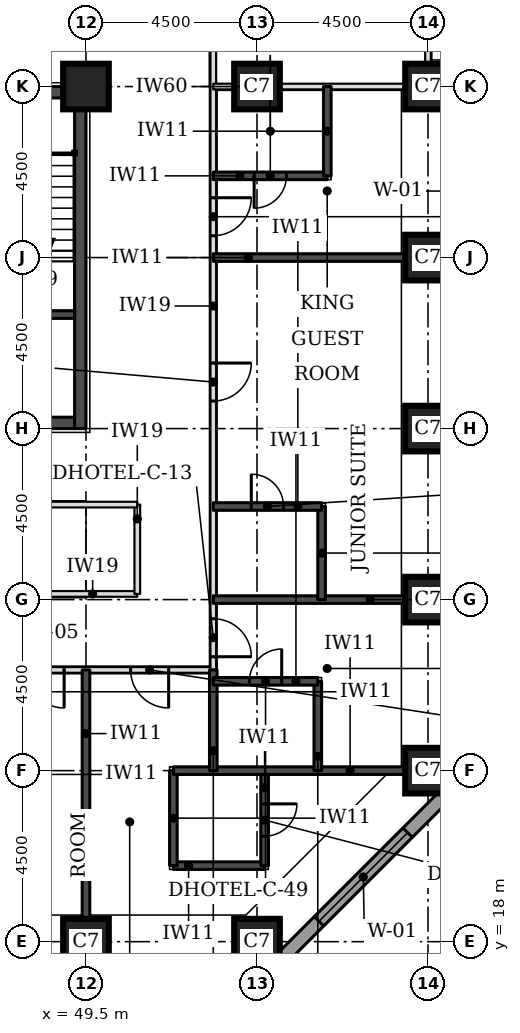
"""IFC4 building model, lengths in metres.
Left out: names, types, materials, properties, quantities, classifications, styles, units other than length and angle.
Written with IfcOpenShell. Run it as: python <this file> out.ifc"""

import sys

from ifc_helpers import new_model, si_unit, direction, frame, frame_2d, origin, origin_2d, place, context, subcontext, project, spatial, rectangle, extrude, element, fill, save


model = new_model("IFC4")
c1 = context("Model", 3, precision=1e-05, world=origin(), true_north=direction((0.0, 1.0)))
c2 = subcontext(c1, "Body", "Model", "MODEL_VIEW")
j1 = project(units=[si_unit("LENGTHUNIT", "METRE"), si_unit("PLANEANGLEUNIT", "RADIAN")], contexts=[c1])
p1 = place(None, origin())
s1 = spatial("IfcSite", under=j1, at=p1, CompositionType="ELEMENT")
p2 = place(p1, origin())
s2 = spatial("IfcBuilding", under=s1, at=p2, CompositionType="ELEMENT")
p3 = place(p2, frame((0.0, 0.0, 33.0)))
s3 = spatial("IfcBuildingStorey", under=s2, at=p3, CompositionType="ELEMENT", Elevation=33.0)
for number, where, z_axis, x_axis in (
    (1, (49.5, 18.0, 0.0), (0.0, 0.0, 1.0), (1.0, 0.0, 0.0)),
    (2, (54.0, 18.0, 0.0), (0.0, 0.0, 1.0), (1.0, 0.0, 0.0)),
    (3, (58.5, 22.5, 0.0), (0.0, 0.0, 1.0), (1.0, 0.0, 0.0)),
    (4, (58.5, 27.0, 0.0), (0.0, 0.0, 1.0), (1.0, 0.0, 0.0)),
    (5, (58.5, 31.5, 0.0), (0.0, 0.0, 1.0), (1.0, 0.0, 0.0)),
    (6, (58.5, 36.0, 0.0), (0.0, 0.0, 1.0), (1.0, 0.0, 0.0)),
    (7, (49.5, 40.5, 0.0), (0.0, 0.0, 1.0), (1.0, 0.0, 0.0)),
    (8, (54.0, 40.5, 0.0), (0.0, 0.0, 1.0), (1.0, 0.0, 0.0)),
    (9, (58.5, 40.5, 0.0), (0.0, 0.0, 1.0), (1.0, 0.0, 0.0)),
):
    element("IfcColumn", number, at=place(p3, frame(where, z_axis=z_axis, x_axis=x_axis)), inside=s3, PredefinedType="COLUMN", context=c2, shape_type="SweptSolid", body=[
        extrude(rectangle(XDim=1.2, YDim=1.2, at=origin_2d()), origin(), (0.0, 0.0, 1.0), 3.3),
    ])
p4 = place(p3, frame((40.8, 31.65, 0.0), z_axis=(0.0, 0.0, 1.0), x_axis=(1.0, 0.0, 0.0)))
e10 = element("IfcWall", 10, at=p4, inside=s3, PredefinedType="SHEAR", context=c2, shape_type="SweptSolid", body=[
    extrude(rectangle(XDim=8.4, YDim=0.3, at=frame_2d((4.2, 0.0))), origin(), (0.0, 0.0, 1.0), 3.3),
])
p5 = place(p4, frame((5.2, 0.0, 0.0)))
e11 = element("IfcOpeningElement", 11, at=p5, cuts=e10, PredefinedType="OPENING", context=c2, shape_type="SweptSolid", body=[
    extrude(rectangle(XDim=1.0, YDim=2.1, at=frame_2d((0.5, 1.05))), frame((0.0, 0.16, 0.0), z_axis=(0.0, -1.0, 0.0), x_axis=(1.0, 0.0, 0.0)), (0.0, 0.0, 1.0), 0.32),
])
p6 = place(p3, frame((40.8, 40.35, 0.0), z_axis=(0.0, 0.0, 1.0), x_axis=(1.0, 0.0, 0.0)))
e12 = element("IfcWall", 12, at=p6, inside=s3, PredefinedType="SHEAR", context=c2, shape_type="SweptSolid", body=[
    extrude(rectangle(XDim=8.4, YDim=0.3, at=frame_2d((4.2, 0.0))), origin(), (0.0, 0.0, 1.0), 3.3),
])
p7 = place(p6, frame((6.4, 0.0, 0.0)))
e13 = element("IfcOpeningElement", 13, at=p7, cuts=e12, PredefinedType="OPENING", context=c2, shape_type="SweptSolid", body=[
    extrude(rectangle(XDim=1.1, YDim=2.1, at=frame_2d((0.55, 1.05))), frame((0.0, 0.16, 0.0), z_axis=(0.0, -1.0, 0.0), x_axis=(1.0, 0.0, 0.0)), (0.0, 0.0, 1.0), 0.32),
])
p8 = place(p3, frame((49.35, 31.5, 0.0), z_axis=(0.0, 0.0, 1.0), x_axis=(0.0, 1.0, 0.0)))
e14 = element("IfcWall", 14, at=p8, inside=s3, PredefinedType="SHEAR", context=c2, shape_type="SweptSolid", body=[
    extrude(rectangle(XDim=9.0, YDim=0.3, at=frame_2d((4.5, 0.0))), origin(), (0.0, 0.0, 1.0), 3.3),
])
p9 = place(p3, frame((54.27, 17.174, 0.0), z_axis=(0.0, 0.0, 1.0), x_axis=(0.707106781187, 0.707106781187, 0.0)))
e15 = element("IfcWall", 15, at=p9, inside=s3, PredefinedType="STANDARD", context=c2, shape_type="SweptSolid", body=[
    extrude(rectangle(XDim=7.151, YDim=0.35, at=frame_2d((3.576, 0.0))), origin(), (0.0, 0.0, 1.0), 3.055),
])
p10 = place(p9, frame((1.926, 0.0, 0.8)))
e16 = element("IfcOpeningElement", 16, at=p10, cuts=e15, PredefinedType="OPENING", context=c2, shape_type="SweptSolid", body=[
    extrude(rectangle(XDim=3.3, YDim=1.5, at=frame_2d((1.65, 0.75))), frame((0.0, 0.185, 0.0), z_axis=(0.0, -1.0, 0.0), x_axis=(1.0, 0.0, 0.0)), (0.0, 0.0, 1.0), 0.37),
])
p11 = place(p3, frame((19.15, 25.15, 0.0), z_axis=(0.0, 0.0, 1.0), x_axis=(1.0, 0.0, 0.0)))
e17 = element("IfcWall", 17, at=p11, inside=s3, PredefinedType="PARTITIONING", context=c2, shape_type="SweptSolid", body=[
    extrude(rectangle(XDim=33.7, YDim=0.15, at=frame_2d((16.85, 0.0))), origin(), (0.0, 0.0, 1.0), 3.08),
])
p12 = place(p11, frame((4.175, 0.0, 0.0)))
e18 = element("IfcOpeningElement", 18, at=p12, cuts=e17, PredefinedType="OPENING", context=c2, shape_type="SweptSolid", body=[
    extrude(rectangle(XDim=1.0, YDim=2.1, at=frame_2d((0.5, 1.05))), frame((0.0, 0.085, 0.0), z_axis=(0.0, -1.0, 0.0), x_axis=(1.0, 0.0, 0.0)), (0.0, 0.0, 1.0), 0.17),
])
p13 = place(p11, frame((13.325, 0.0, 0.0)))
e19 = element("IfcOpeningElement", 19, at=p13, cuts=e17, PredefinedType="OPENING", context=c2, shape_type="SweptSolid", body=[
    extrude(rectangle(XDim=1.0, YDim=2.1, at=frame_2d((0.5, 1.05))), frame((0.0, 0.085, 0.0), z_axis=(0.0, -1.0, 0.0), x_axis=(1.0, 0.0, 0.0)), (0.0, 0.0, 1.0), 0.17),
])
p14 = place(p11, frame((19.625, 0.0, 0.0)))
e20 = element("IfcOpeningElement", 20, at=p14, cuts=e17, PredefinedType="OPENING", context=c2, shape_type="SweptSolid", body=[
    extrude(rectangle(XDim=1.0, YDim=2.1, at=frame_2d((0.5, 1.05))), frame((0.0, 0.085, 0.0), z_axis=(0.0, -1.0, 0.0), x_axis=(1.0, 0.0, 0.0)), (0.0, 0.0, 1.0), 0.17),
])
p15 = place(p11, frame((28.775, 0.0, 0.0)))
e21 = element("IfcOpeningElement", 21, at=p15, cuts=e17, PredefinedType="OPENING", context=c2, shape_type="SweptSolid", body=[
    extrude(rectangle(XDim=1.0, YDim=2.1, at=frame_2d((0.5, 1.05))), frame((0.0, 0.085, 0.0), z_axis=(0.0, -1.0, 0.0), x_axis=(1.0, 0.0, 0.0)), (0.0, 0.0, 1.0), 0.17),
])
p16 = place(p11, frame((1.175, 0.0, 0.0)))
e22 = element("IfcOpeningElement", 22, at=p16, cuts=e17, PredefinedType="OPENING", context=c2, shape_type="SweptSolid", body=[
    extrude(rectangle(XDim=1.0, YDim=2.1, at=frame_2d((0.5, 1.05))), frame((0.0, 0.085, 0.0), z_axis=(0.0, -1.0, 0.0), x_axis=(1.0, 0.0, 0.0)), (0.0, 0.0, 1.0), 0.17),
])
p17 = place(p11, frame((31.525, 0.0, 0.0)))
e23 = element("IfcOpeningElement", 23, at=p17, cuts=e17, PredefinedType="OPENING", context=c2, shape_type="SweptSolid", body=[
    extrude(rectangle(XDim=1.0, YDim=2.1, at=frame_2d((0.5, 1.05))), frame((0.0, 0.085, 0.0), z_axis=(0.0, -1.0, 0.0), x_axis=(1.0, 0.0, 0.0)), (0.0, 0.0, 1.0), 0.17),
])
p18 = place(p3, frame((52.85, 25.15, 0.0), z_axis=(0.0, 0.0, 1.0), x_axis=(0.0, 1.0, 0.0)))
e24 = element("IfcWall", 24, at=p18, inside=s3, PredefinedType="PARTITIONING", context=c2, shape_type="SweptSolid", body=[
    extrude(rectangle(XDim=22.35, YDim=0.15, at=frame_2d((11.175, 0.0))), origin(), (0.0, 0.0, 1.0), 3.08),
])
p19 = place(p18, frame((0.347, 0.0, 0.0)))
e25 = element("IfcOpeningElement", 25, at=p19, cuts=e24, PredefinedType="OPENING", context=c2, shape_type="SweptSolid", body=[
    extrude(rectangle(XDim=1.0, YDim=2.1, at=frame_2d((0.5, 1.05))), frame((0.0, 0.085, 0.0), z_axis=(0.0, -1.0, 0.0), x_axis=(1.0, 0.0, 0.0)), (0.0, 0.0, 1.0), 0.17),
])
p20 = place(p18, frame((7.075, 0.0, 0.0)))
e26 = element("IfcOpeningElement", 26, at=p20, cuts=e24, PredefinedType="OPENING", context=c2, shape_type="SweptSolid", body=[
    extrude(rectangle(XDim=1.0, YDim=2.1, at=frame_2d((0.5, 1.05))), frame((0.0, 0.085, 0.0), z_axis=(0.0, -1.0, 0.0), x_axis=(1.0, 0.0, 0.0)), (0.0, 0.0, 1.0), 0.17),
])
p21 = place(p18, frame((11.425, 0.0, 0.0)))
e27 = element("IfcOpeningElement", 27, at=p21, cuts=e24, PredefinedType="OPENING", context=c2, shape_type="SweptSolid", body=[
    extrude(rectangle(XDim=1.0, YDim=2.1, at=frame_2d((0.5, 1.05))), frame((0.0, 0.085, 0.0), z_axis=(0.0, -1.0, 0.0), x_axis=(1.0, 0.0, 0.0)), (0.0, 0.0, 1.0), 0.17),
])
p22 = place(p18, frame((17.15, 0.0, 0.0)))
e28 = element("IfcOpeningElement", 28, at=p22, cuts=e24, PredefinedType="OPENING", context=c2, shape_type="SweptSolid", body=[
    extrude(rectangle(XDim=0.9, YDim=2.1, at=frame_2d((0.45, 1.05))), frame((0.0, 0.085, 0.0), z_axis=(0.0, -1.0, 0.0), x_axis=(1.0, 0.0, 0.0)), (0.0, 0.0, 1.0), 0.17),
])
p23 = place(p3, frame((40.5, 27.15, 0.0), z_axis=(0.0, 0.0, 1.0), x_axis=(1.0, 0.0, 0.0)))
e29 = element("IfcWall", 29, at=p23, inside=s3, PredefinedType="PARTITIONING", context=c2, shape_type="SweptSolid", body=[
    extrude(rectangle(XDim=10.35, YDim=0.15, at=frame_2d((5.175, 0.0))), origin(), (0.0, 0.0, 1.0), 3.08),
])
p24 = place(p3, frame((50.85, 27.15, 0.0), z_axis=(0.0, 0.0, 1.0), x_axis=(0.0, 1.0, 0.0)))
e30 = element("IfcWall", 30, at=p24, inside=s3, PredefinedType="PARTITIONING", context=c2, shape_type="SweptSolid", body=[
    extrude(rectangle(XDim=2.35, YDim=0.15, at=frame_2d((1.175, 0.0))), origin(), (0.0, 0.0, 1.0), 3.08),
])
p25 = place(p3, frame((40.5, 29.5, 0.0), z_axis=(0.0, 0.0, 1.0), x_axis=(1.0, 0.0, 0.0)))
e31 = element("IfcWall", 31, at=p25, inside=s3, PredefinedType="PARTITIONING", context=c2, shape_type="SweptSolid", body=[
    extrude(rectangle(XDim=10.35, YDim=0.15, at=frame_2d((5.175, 0.0))), origin(), (0.0, 0.0, 1.0), 3.08),
])
p26 = place(p25, frame((4.06, 0.0, 0.0)))
e32 = element("IfcOpeningElement", 32, at=p26, cuts=e31, PredefinedType="OPENING", context=c2, shape_type="SweptSolid", body=[
    extrude(rectangle(XDim=0.9, YDim=2.1, at=frame_2d((0.45, 1.05))), frame((0.0, 0.085, 0.0), z_axis=(0.0, -1.0, 0.0), x_axis=(1.0, 0.0, 0.0)), (0.0, 0.0, 1.0), 0.17),
])
p27 = place(p3, frame((49.5, 18.6, 0.0), z_axis=(0.0, 0.0, 1.0), x_axis=(0.0, 1.0, 0.0)))
e33 = element("IfcWall", 33, at=p27, inside=s3, PredefinedType="SOLIDWALL", context=c2, shape_type="SweptSolid", body=[
    extrude(rectangle(XDim=6.55, YDim=0.2, at=frame_2d((3.275, 0.0))), origin(), (0.0, 0.0, 1.0), 3.08),
])
p28 = place(p3, frame((51.8, 20.0, 0.0), z_axis=(0.0, 0.0, 1.0), x_axis=(1.0, 0.0, 0.0)))
e34 = element("IfcWall", 34, at=p28, inside=s3, PredefinedType="SOLIDWALL", context=c2, shape_type="SweptSolid", body=[
    extrude(rectangle(XDim=2.4, YDim=0.2, at=frame_2d((1.2, 0.0))), origin(), (0.0, 0.0, 1.0), 3.08),
])
p29 = place(p3, frame((51.8, 20.0, 0.0), z_axis=(0.0, 0.0, 1.0), x_axis=(0.0, 1.0, 0.0)))
e35 = element("IfcWall", 35, at=p29, inside=s3, PredefinedType="SOLIDWALL", context=c2, shape_type="SweptSolid", body=[
    extrude(rectangle(XDim=2.5, YDim=0.2, at=frame_2d((1.25, 0.0))), origin(), (0.0, 0.0, 1.0), 3.08),
])
p30 = place(p3, frame((54.2, 20.0, 0.0), z_axis=(0.0, 0.0, 1.0), x_axis=(0.0, 1.0, 0.0)))
e36 = element("IfcWall", 36, at=p30, inside=s3, PredefinedType="SOLIDWALL", context=c2, shape_type="SweptSolid", body=[
    extrude(rectangle(XDim=2.5, YDim=0.2, at=frame_2d((1.25, 0.0))), origin(), (0.0, 0.0, 1.0), 3.08),
])
p31 = place(p30, frame((0.775, 0.0, 0.0)))
e37 = element("IfcOpeningElement", 37, at=p31, cuts=e36, PredefinedType="OPENING", context=c2, shape_type="SweptSolid", body=[
    extrude(rectangle(XDim=0.85, YDim=2.1, at=frame_2d((0.425, 1.05))), frame((0.0, 0.11, 0.0), z_axis=(0.0, -1.0, 0.0), x_axis=(1.0, 0.0, 0.0)), (0.0, 0.0, 1.0), 0.22),
])
p32 = place(p3, frame((51.8, 22.5, 0.0), z_axis=(0.0, 0.0, 1.0), x_axis=(1.0, 0.0, 0.0)))
e38 = element("IfcWall", 38, at=p32, inside=s3, PredefinedType="SOLIDWALL", context=c2, shape_type="SweptSolid", body=[
    extrude(rectangle(XDim=6.1, YDim=0.2, at=frame_2d((3.05, 0.0))), origin(), (0.0, 0.0, 1.0), 3.08),
])
p33 = place(p3, frame((52.85, 22.5, 0.0), z_axis=(0.0, 0.0, 1.0), x_axis=(0.0, 1.0, 0.0)))
e39 = element("IfcWall", 39, at=p33, inside=s3, PredefinedType="SOLIDWALL", context=c2, shape_type="SweptSolid", body=[
    extrude(rectangle(XDim=2.65, YDim=0.2, at=frame_2d((1.325, 0.0))), origin(), (0.0, 0.0, 1.0), 3.08),
])
p34 = place(p3, frame((55.6, 22.5, 0.0), z_axis=(0.0, 0.0, 1.0), x_axis=(0.0, 1.0, 0.0)))
e40 = element("IfcWall", 40, at=p34, inside=s3, PredefinedType="SOLIDWALL", context=c2, shape_type="SweptSolid", body=[
    extrude(rectangle(XDim=2.35, YDim=0.2, at=frame_2d((1.175, 0.0))), origin(), (0.0, 0.0, 1.0), 3.08),
])
p35 = place(p3, frame((52.85, 24.85, 0.0), z_axis=(0.0, 0.0, 1.0), x_axis=(1.0, 0.0, 0.0)))
e41 = element("IfcWall", 41, at=p35, inside=s3, PredefinedType="SOLIDWALL", context=c2, shape_type="SweptSolid", body=[
    extrude(rectangle(XDim=2.75, YDim=0.2, at=frame_2d((1.375, 0.0))), origin(), (0.0, 0.0, 1.0), 3.08),
])
p36 = place(p35, frame((0.95, 0.0, 0.0)))
e42 = element("IfcOpeningElement", 42, at=p36, cuts=e41, PredefinedType="OPENING", context=c2, shape_type="SweptSolid", body=[
    extrude(rectangle(XDim=0.85, YDim=2.1, at=frame_2d((0.425, 1.05))), frame((0.0, 0.11, 0.0), z_axis=(0.0, -1.0, 0.0), x_axis=(1.0, 0.0, 0.0)), (0.0, 0.0, 1.0), 0.22),
])
p37 = place(p3, frame((52.85, 27.0, 0.0), z_axis=(0.0, 0.0, 1.0), x_axis=(1.0, 0.0, 0.0)))
e43 = element("IfcWall", 43, at=p37, inside=s3, PredefinedType="SOLIDWALL", context=c2, shape_type="SweptSolid", body=[
    extrude(rectangle(XDim=5.05, YDim=0.2, at=frame_2d((2.525, 0.0))), origin(), (0.0, 0.0, 1.0), 3.08),
])
p38 = place(p3, frame((55.7, 27.0, 0.0), z_axis=(0.0, 0.0, 1.0), x_axis=(0.0, 1.0, 0.0)))
e44 = element("IfcWall", 44, at=p38, inside=s3, PredefinedType="SOLIDWALL", context=c2, shape_type="SweptSolid", body=[
    extrude(rectangle(XDim=2.45, YDim=0.2, at=frame_2d((1.225, 0.0))), origin(), (0.0, 0.0, 1.0), 3.08),
])
p39 = place(p3, frame((52.85, 29.45, 0.0), z_axis=(0.0, 0.0, 1.0), x_axis=(1.0, 0.0, 0.0)))
e45 = element("IfcWall", 45, at=p39, inside=s3, PredefinedType="SOLIDWALL", context=c2, shape_type="SweptSolid", body=[
    extrude(rectangle(XDim=2.85, YDim=0.2, at=frame_2d((1.425, 0.0))), origin(), (0.0, 0.0, 1.0), 3.08),
])
p40 = place(p39, frame((1.0, 0.0, 0.0)))
e46 = element("IfcOpeningElement", 46, at=p40, cuts=e45, PredefinedType="OPENING", context=c2, shape_type="SweptSolid", body=[
    extrude(rectangle(XDim=0.85, YDim=2.1, at=frame_2d((0.425, 1.05))), frame((0.0, 0.11, 0.0), z_axis=(0.0, -1.0, 0.0), x_axis=(1.0, 0.0, 0.0)), (0.0, 0.0, 1.0), 0.22),
])
p41 = place(p3, frame((52.85, 36.0, 0.0), z_axis=(0.0, 0.0, 1.0), x_axis=(1.0, 0.0, 0.0)))
e47 = element("IfcWall", 47, at=p41, inside=s3, PredefinedType="SOLIDWALL", context=c2, shape_type="SweptSolid", body=[
    extrude(rectangle(XDim=5.05, YDim=0.2, at=frame_2d((2.525, 0.0))), origin(), (0.0, 0.0, 1.0), 3.08),
])
p42 = place(p3, frame((52.85, 38.15, 0.0), z_axis=(0.0, 0.0, 1.0), x_axis=(1.0, 0.0, 0.0)))
e48 = element("IfcWall", 48, at=p42, inside=s3, PredefinedType="SOLIDWALL", context=c2, shape_type="SweptSolid", body=[
    extrude(rectangle(XDim=3.0, YDim=0.2, at=frame_2d((1.5, 0.0))), origin(), (0.0, 0.0, 1.0), 3.08),
])
p43 = place(p42, frame((1.075, 0.0, 0.0)))
e49 = element("IfcOpeningElement", 49, at=p43, cuts=e48, PredefinedType="OPENING", context=c2, shape_type="SweptSolid", body=[
    extrude(rectangle(XDim=0.85, YDim=2.1, at=frame_2d((0.425, 1.05))), frame((0.0, 0.11, 0.0), z_axis=(0.0, -1.0, 0.0), x_axis=(1.0, 0.0, 0.0)), (0.0, 0.0, 1.0), 0.22),
])
p44 = place(p3, frame((55.85, 38.15, 0.0), z_axis=(0.0, 0.0, 1.0), x_axis=(0.0, 1.0, 0.0)))
e50 = element("IfcWall", 50, at=p44, inside=s3, PredefinedType="SOLIDWALL", context=c2, shape_type="SweptSolid", body=[
    extrude(rectangle(XDim=2.35, YDim=0.2, at=frame_2d((1.175, 0.0))), origin(), (0.0, 0.0, 1.0), 3.08),
])
p45 = place(p3, frame((52.85, 40.5, 0.0), z_axis=(0.0, 0.0, 1.0), x_axis=(1.0, 0.0, 0.0)))
e51 = element("IfcWall", 51, at=p45, inside=s3, PredefinedType="PARTITIONING", context=c2, shape_type="SweptSolid", body=[
    extrude(rectangle(XDim=5.05, YDim=0.15, at=frame_2d((2.525, 0.0))), origin(), (0.0, 0.0, 1.0), 2.33),
])
p46 = place(p3, frame((58.5, 41.1, 0.0), z_axis=(0.0, 0.0, 1.0), x_axis=(0.0, 1.0, 0.0)))
e52 = element("IfcWall", 52, at=p46, inside=s3, PredefinedType="PARTITIONING", context=c2, shape_type="SweptSolid", body=[
    extrude(rectangle(XDim=6.4, YDim=0.15, at=frame_2d((3.2, 0.0))), origin(), (0.0, 0.0, 1.0), 3.08),
])
p47 = place(p3, frame((46.2, 34.5, 0.0), z_axis=(0.0, 0.0, 1.0), x_axis=(1.0, 0.0, 0.0)))
e53 = element("IfcWall", 53, at=p47, inside=s3, PredefinedType="SOLIDWALL", context=c2, shape_type="SweptSolid", body=[
    extrude(rectangle(XDim=3.0, YDim=0.2, at=frame_2d((1.5, 0.0))), origin(), (0.0, 0.0, 1.0), 3.08),
])
p48 = place(p10, origin())
e54 = element("IfcWindow", 54, at=p48, inside=s3, PartitioningType="SINGLE_PANEL", PredefinedType="WINDOW", context=c2, shape_type="SweptSolid", body=[
    extrude(rectangle(XDim=3.3, YDim=1.5, at=frame_2d((1.65, 0.75))), frame((0.0, 0.085, 0.0), z_axis=(0.0, -1.0, 0.0), x_axis=(1.0, 0.0, 0.0)), (0.0, 0.0, 1.0), 0.06),
])
fill(e16, e54)
p49 = place(p15, frame((1.0, 0.0, 0.0), z_axis=(0.0, 0.0, 1.0), x_axis=(-1.0, 0.0, 0.0)))
e55 = element("IfcDoor", 55, at=p49, inside=s3, OperationType="SINGLE_SWING_LEFT", PredefinedType="DOOR", context=c2, shape_type="SweptSolid", body=[
    extrude(rectangle(XDim=1.0, YDim=2.1, at=frame_2d((0.5, 1.05))), frame((0.0, 0.025, 0.0), z_axis=(0.0, -1.0, 0.0), x_axis=(1.0, 0.0, 0.0)), (0.0, 0.0, 1.0), 0.05),
])
fill(e21, e55)
p50 = place(p19, frame((1.0, 0.0, 0.0), z_axis=(0.0, 0.0, 1.0), x_axis=(-1.0, 0.0, 0.0)))
e56 = element("IfcDoor", 56, at=p50, inside=s3, OperationType="SINGLE_SWING_RIGHT", PredefinedType="DOOR", context=c2, shape_type="SweptSolid", body=[
    extrude(rectangle(XDim=1.0, YDim=2.1, at=frame_2d((0.5, 1.05))), frame((0.0, 0.025, 0.0), z_axis=(0.0, -1.0, 0.0), x_axis=(1.0, 0.0, 0.0)), (0.0, 0.0, 1.0), 0.05),
])
fill(e25, e56)
p51 = place(p36, origin())
e57 = element("IfcDoor", 57, at=p51, inside=s3, OperationType="SINGLE_SWING_RIGHT", PredefinedType="DOOR", context=c2, shape_type="SweptSolid", body=[
    extrude(rectangle(XDim=0.85, YDim=2.1, at=frame_2d((0.425, 1.05))), frame((0.0, 0.025, 0.0), z_axis=(0.0, -1.0, 0.0), x_axis=(1.0, 0.0, 0.0)), (0.0, 0.0, 1.0), 0.05),
])
fill(e42, e57)
p52 = place(p20, frame((1.0, 0.0, 0.0), z_axis=(0.0, 0.0, 1.0), x_axis=(-1.0, 0.0, 0.0)))
e58 = element("IfcDoor", 58, at=p52, inside=s3, OperationType="SINGLE_SWING_LEFT", PredefinedType="DOOR", context=c2, shape_type="SweptSolid", body=[
    extrude(rectangle(XDim=1.0, YDim=2.1, at=frame_2d((0.5, 1.05))), frame((0.0, 0.025, 0.0), z_axis=(0.0, -1.0, 0.0), x_axis=(1.0, 0.0, 0.0)), (0.0, 0.0, 1.0), 0.05),
])
fill(e26, e58)
p53 = place(p40, origin())
e59 = element("IfcDoor", 59, at=p53, inside=s3, OperationType="SINGLE_SWING_LEFT", PredefinedType="DOOR", context=c2, shape_type="SweptSolid", body=[
    extrude(rectangle(XDim=0.85, YDim=2.1, at=frame_2d((0.425, 1.05))), frame((0.0, 0.025, 0.0), z_axis=(0.0, -1.0, 0.0), x_axis=(1.0, 0.0, 0.0)), (0.0, 0.0, 1.0), 0.05),
])
fill(e46, e59)
p54 = place(p21, frame((1.0, 0.0, 0.0), z_axis=(0.0, 0.0, 1.0), x_axis=(-1.0, 0.0, 0.0)))
e60 = element("IfcDoor", 60, at=p54, inside=s3, OperationType="SINGLE_SWING_LEFT", PredefinedType="DOOR", context=c2, shape_type="SweptSolid", body=[
    extrude(rectangle(XDim=1.0, YDim=2.1, at=frame_2d((0.5, 1.05))), frame((0.0, 0.025, 0.0), z_axis=(0.0, -1.0, 0.0), x_axis=(1.0, 0.0, 0.0)), (0.0, 0.0, 1.0), 0.05),
])
fill(e27, e60)
p55 = place(p43, frame((0.85, 0.0, 0.0), z_axis=(0.0, 0.0, 1.0), x_axis=(-1.0, 0.0, 0.0)))
e61 = element("IfcDoor", 61, at=p55, inside=s3, OperationType="SINGLE_SWING_RIGHT", PredefinedType="DOOR", context=c2, shape_type="SweptSolid", body=[
    extrude(rectangle(XDim=0.85, YDim=2.1, at=frame_2d((0.425, 1.05))), frame((0.0, 0.025, 0.0), z_axis=(0.0, -1.0, 0.0), x_axis=(1.0, 0.0, 0.0)), (0.0, 0.0, 1.0), 0.05),
])
fill(e49, e61)
p56 = place(p17, frame((1.0, 0.0, 0.0), z_axis=(0.0, 0.0, 1.0), x_axis=(-1.0, 0.0, 0.0)))
e62 = element("IfcDoor", 62, at=p56, inside=s3, OperationType="SINGLE_SWING_LEFT", PredefinedType="DOOR", context=c2, shape_type="SweptSolid", body=[
    extrude(rectangle(XDim=1.0, YDim=2.1, at=frame_2d((0.5, 1.05))), frame((0.0, 0.025, 0.0), z_axis=(0.0, -1.0, 0.0), x_axis=(1.0, 0.0, 0.0)), (0.0, 0.0, 1.0), 0.05),
])
fill(e23, e62)
p57 = place(p31, frame((0.85, 0.0, 0.0), z_axis=(0.0, 0.0, 1.0), x_axis=(-1.0, 0.0, 0.0)))
e63 = element("IfcDoor", 63, at=p57, inside=s3, OperationType="SINGLE_SWING_LEFT", PredefinedType="DOOR", context=c2, shape_type="SweptSolid", body=[
    extrude(rectangle(XDim=0.85, YDim=2.1, at=frame_2d((0.425, 1.05))), frame((0.0, 0.025, 0.0), z_axis=(0.0, -1.0, 0.0), x_axis=(1.0, 0.0, 0.0)), (0.0, 0.0, 1.0), 0.05),
])
fill(e37, e63)
save(model, sys.argv[1])
